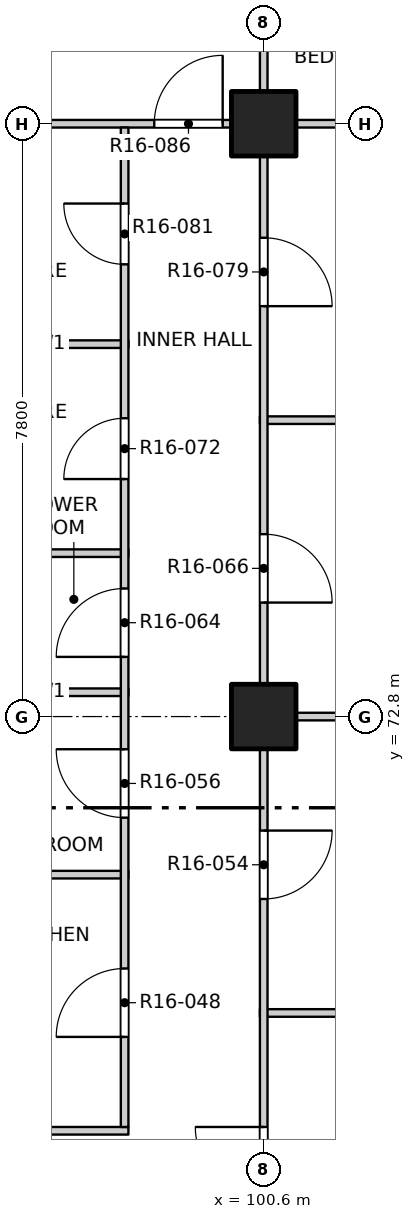
"""IFC4 building model, lengths in metres.
Left out: names, types, materials, properties, quantities, classifications, styles, units other than length and angle.
Written with IfcOpenShell. Run it as: python <this file> out.ifc"""

import sys

from ifc_helpers import new_model, si_unit, direction, frame, frame_2d, origin, origin_2d, place, context, subcontext, project, spatial, rectangle, extrude, element, fill, save


model = new_model("IFC4")
c1 = context("Model", 3, precision=1e-05, world=origin(), true_north=direction((0.0, 1.0)))
c2 = subcontext(c1, "Body", "Model", "MODEL_VIEW")
j1 = project(units=[si_unit("LENGTHUNIT", "METRE"), si_unit("PLANEANGLEUNIT", "RADIAN")], contexts=[c1])
p1 = place(None, origin())
s1 = spatial("IfcSite", under=j1, at=p1, CompositionType="ELEMENT")
p2 = place(p1, origin())
s2 = spatial("IfcBuilding", under=s1, at=p2, CompositionType="ELEMENT")
p3 = place(p2, frame((0.0, 0.0, 169.0)))
s3 = spatial("IfcBuildingStorey", under=s2, at=p3, CompositionType="ELEMENT", Elevation=169.0)
for number, where, z_axis, x_axis in (
    (1, (100.6, 72.8, -0.25), (0.0, 0.0, 1.0), (1.0, 0.0, 0.0)),
    (2, (100.6, 80.6, -0.25), (0.0, 0.0, 1.0), (1.0, 0.0, 0.0)),
):
    element("IfcColumn", number, at=place(p3, frame(where, z_axis=z_axis, x_axis=x_axis)), inside=s3, PredefinedType="COLUMN", context=c2, shape_type="SweptSolid", body=[
        extrude(rectangle(XDim=0.85, YDim=0.85, at=origin_2d()), origin(), (0.0, 0.0, 1.0), 3.35),
    ])
p4 = place(p3, frame((96.6, 67.35, 0.0), z_axis=(0.0, 0.0, 1.0), x_axis=(1.0, 0.0, 0.0)))
e3 = element("IfcWall", 3, at=p4, inside=s3, PredefinedType="PARTITIONING", context=c2, shape_type="SweptSolid", body=[
    extrude(rectangle(XDim=2.22, YDim=0.1, at=frame_2d((1.11, 0.0))), origin(), (0.0, 0.0, 1.0), 3.1),
])
p5 = place(p3, frame((100.55, 68.9, 0.0), z_axis=(0.0, 0.0, 1.0), x_axis=(1.0, 0.0, 0.0)))
e4 = element("IfcWall", 4, at=p5, inside=s3, PredefinedType="PARTITIONING", context=c2, shape_type="SweptSolid", body=[
    extrude(rectangle(XDim=3.65, YDim=0.1, at=frame_2d((1.825, 0.0))), origin(), (0.0, 0.0, 1.0), 3.1),
])
p6 = place(p3, frame((96.6, 70.72, 0.0), z_axis=(0.0, 0.0, 1.0), x_axis=(1.0, 0.0, 0.0)))
e5 = element("IfcWall", 5, at=p6, inside=s3, PredefinedType="PARTITIONING", context=c2, shape_type="SweptSolid", body=[
    extrude(rectangle(XDim=2.22, YDim=0.1, at=frame_2d((1.11, 0.0))), origin(), (0.0, 0.0, 1.0), 3.1),
])
p7 = place(p3, frame((100.55, 72.8, 0.0), z_axis=(0.0, 0.0, 1.0), x_axis=(1.0, 0.0, 0.0)))
e6 = element("IfcWall", 6, at=p7, inside=s3, PredefinedType="PARTITIONING", context=c2, shape_type="SweptSolid", body=[
    extrude(rectangle(XDim=3.65, YDim=0.1, at=frame_2d((1.825, 0.0))), origin(), (0.0, 0.0, 1.0), 3.1),
])
for number, where, z_axis, x_axis in (
    (7, (96.6, 73.12, 0.0), (0.0, 0.0, 1.0), (1.0, 0.0, 0.0)),
    (8, (96.6, 74.95, 0.0), (0.0, 0.0, 1.0), (1.0, 0.0, 0.0)),
):
    element("IfcWall", number, at=place(p3, frame(where, z_axis=z_axis, x_axis=x_axis)), inside=s3, PredefinedType="PARTITIONING", context=c2, shape_type="SweptSolid", body=[
        extrude(rectangle(XDim=2.22, YDim=0.1, at=frame_2d((1.11, 0.0))), origin(), (0.0, 0.0, 1.0), 3.1),
    ])
p8 = place(p3, frame((100.55, 76.7, 0.0), z_axis=(0.0, 0.0, 1.0), x_axis=(1.0, 0.0, 0.0)))
e9 = element("IfcWall", 9, at=p8, inside=s3, PredefinedType="PARTITIONING", context=c2, shape_type="SweptSolid", body=[
    extrude(rectangle(XDim=3.65, YDim=0.1, at=frame_2d((1.825, 0.0))), origin(), (0.0, 0.0, 1.0), 3.1),
])
p9 = place(p3, frame((96.6, 77.7, 0.0), z_axis=(0.0, 0.0, 1.0), x_axis=(1.0, 0.0, 0.0)))
e10 = element("IfcWall", 10, at=p9, inside=s3, PredefinedType="PARTITIONING", context=c2, shape_type="SweptSolid", body=[
    extrude(rectangle(XDim=2.22, YDim=0.1, at=frame_2d((1.11, 0.0))), origin(), (0.0, 0.0, 1.0), 3.1),
])
p10 = place(p3, frame((96.6, 80.6, 0.0), z_axis=(0.0, 0.0, 1.0), x_axis=(1.0, 0.0, 0.0)))
e11 = element("IfcWall", 11, at=p10, inside=s3, PredefinedType="PARTITIONING", context=c2, shape_type="SweptSolid", body=[
    extrude(rectangle(XDim=7.6, YDim=0.1, at=frame_2d((3.8, 0.0))), origin(), (0.0, 0.0, 1.0), 3.1),
])
p11 = place(p10, frame((2.56, 0.0, 0.0)))
e12 = element("IfcOpeningElement", 12, at=p11, cuts=e11, PredefinedType="OPENING", context=c2, shape_type="SweptSolid", body=[
    extrude(rectangle(XDim=0.9, YDim=2.1, at=frame_2d((0.45, 1.05))), frame((0.0, 0.06, 0.0), z_axis=(0.0, -1.0, 0.0), x_axis=(1.0, 0.0, 0.0)), (0.0, 0.0, 1.0), 0.12),
])
p12 = place(p3, frame((98.77, 67.4, 0.0), z_axis=(0.0, 0.0, 1.0), x_axis=(0.0, 1.0, 0.0)))
e13 = element("IfcWall", 13, at=p12, inside=s3, PredefinedType="PARTITIONING", context=c2, shape_type="SweptSolid", body=[
    extrude(rectangle(XDim=13.15, YDim=0.1, at=frame_2d((6.575, 0.0))), origin(), (0.0, 0.0, 1.0), 3.1),
])
p13 = place(p12, frame((1.185, 0.0, 0.0)))
e14 = element("IfcOpeningElement", 14, at=p13, cuts=e13, PredefinedType="OPENING", context=c2, shape_type="SweptSolid", body=[
    extrude(rectangle(XDim=0.9, YDim=2.1, at=frame_2d((0.45, 1.05))), frame((0.0, 0.06, 0.0), z_axis=(0.0, -1.0, 0.0), x_axis=(1.0, 0.0, 0.0)), (0.0, 0.0, 1.0), 0.12),
])
p14 = place(p12, frame((4.07, 0.0, 0.0)))
e15 = element("IfcOpeningElement", 15, at=p14, cuts=e13, PredefinedType="OPENING", context=c2, shape_type="SweptSolid", body=[
    extrude(rectangle(XDim=0.9, YDim=2.1, at=frame_2d((0.45, 1.05))), frame((0.0, 0.06, 0.0), z_axis=(0.0, -1.0, 0.0), x_axis=(1.0, 0.0, 0.0)), (0.0, 0.0, 1.0), 0.12),
])
p15 = place(p12, frame((6.185, 0.0, 0.0)))
e16 = element("IfcOpeningElement", 16, at=p15, cuts=e13, PredefinedType="OPENING", context=c2, shape_type="SweptSolid", body=[
    extrude(rectangle(XDim=0.9, YDim=2.1, at=frame_2d((0.45, 1.05))), frame((0.0, 0.06, 0.0), z_axis=(0.0, -1.0, 0.0), x_axis=(1.0, 0.0, 0.0)), (0.0, 0.0, 1.0), 0.12),
])
p16 = place(p12, frame((8.525, 0.0, 0.0)))
e17 = element("IfcOpeningElement", 17, at=p16, cuts=e13, PredefinedType="OPENING", context=c2, shape_type="SweptSolid", body=[
    extrude(rectangle(XDim=0.8, YDim=2.1, at=frame_2d((0.4, 1.05))), frame((0.0, 0.06, 0.0), z_axis=(0.0, -1.0, 0.0), x_axis=(1.0, 0.0, 0.0)), (0.0, 0.0, 1.0), 0.12),
])
p17 = place(p12, frame((11.35, 0.0, 0.0)))
e18 = element("IfcOpeningElement", 18, at=p17, cuts=e13, PredefinedType="OPENING", context=c2, shape_type="SweptSolid", body=[
    extrude(rectangle(XDim=0.8, YDim=2.1, at=frame_2d((0.4, 1.05))), frame((0.0, 0.06, 0.0), z_axis=(0.0, -1.0, 0.0), x_axis=(1.0, 0.0, 0.0)), (0.0, 0.0, 1.0), 0.12),
])
p18 = place(p3, frame((100.6, 45.8, 0.0), z_axis=(0.0, 0.0, 1.0), x_axis=(0.0, 1.0, 0.0)))
e19 = element("IfcWall", 19, at=p18, inside=s3, PredefinedType="PARTITIONING", context=c2, shape_type="SweptSolid", body=[
    extrude(rectangle(XDim=38.4, YDim=0.1, at=frame_2d((19.2, 0.0))), origin(), (0.0, 0.0, 1.0), 3.1),
])
p19 = place(p18, frame((1.05, 0.0, 0.0)))
e20 = element("IfcOpeningElement", 20, at=p19, cuts=e19, PredefinedType="OPENING", context=c2, shape_type="SweptSolid", body=[
    extrude(rectangle(XDim=1.2, YDim=2.1, at=frame_2d((0.6, 1.05))), frame((0.0, 0.06, 0.0), z_axis=(0.0, -1.0, 0.0), x_axis=(1.0, 0.0, 0.0)), (0.0, 0.0, 1.0), 0.12),
])
p20 = place(p18, frame((6.9, 0.0, 0.0)))
e21 = element("IfcOpeningElement", 21, at=p20, cuts=e19, PredefinedType="OPENING", context=c2, shape_type="SweptSolid", body=[
    extrude(rectangle(XDim=1.2, YDim=2.1, at=frame_2d((0.6, 1.05))), frame((0.0, 0.06, 0.0), z_axis=(0.0, -1.0, 0.0), x_axis=(1.0, 0.0, 0.0)), (0.0, 0.0, 1.0), 0.12),
])
p21 = place(p18, frame((12.9, 0.0, 0.0)))
e22 = element("IfcOpeningElement", 22, at=p21, cuts=e19, PredefinedType="OPENING", context=c2, shape_type="SweptSolid", body=[
    extrude(rectangle(XDim=0.9, YDim=2.1, at=frame_2d((0.45, 1.05))), frame((0.0, 0.06, 0.0), z_axis=(0.0, -1.0, 0.0), x_axis=(1.0, 0.0, 0.0)), (0.0, 0.0, 1.0), 0.12),
])
p22 = place(p18, frame((16.8, 0.0, 0.0)))
e23 = element("IfcOpeningElement", 23, at=p22, cuts=e19, PredefinedType="OPENING", context=c2, shape_type="SweptSolid", body=[
    extrude(rectangle(XDim=0.9, YDim=2.1, at=frame_2d((0.45, 1.05))), frame((0.0, 0.06, 0.0), z_axis=(0.0, -1.0, 0.0), x_axis=(1.0, 0.0, 0.0)), (0.0, 0.0, 1.0), 0.12),
])
p23 = place(p18, frame((20.7, 0.0, 0.0)))
e24 = element("IfcOpeningElement", 24, at=p23, cuts=e19, PredefinedType="OPENING", context=c2, shape_type="SweptSolid", body=[
    extrude(rectangle(XDim=0.9, YDim=2.1, at=frame_2d((0.45, 1.05))), frame((0.0, 0.06, 0.0), z_axis=(0.0, -1.0, 0.0), x_axis=(1.0, 0.0, 0.0)), (0.0, 0.0, 1.0), 0.12),
])
p24 = place(p18, frame((24.6, 0.0, 0.0)))
e25 = element("IfcOpeningElement", 25, at=p24, cuts=e19, PredefinedType="OPENING", context=c2, shape_type="SweptSolid", body=[
    extrude(rectangle(XDim=0.9, YDim=2.1, at=frame_2d((0.45, 1.05))), frame((0.0, 0.06, 0.0), z_axis=(0.0, -1.0, 0.0), x_axis=(1.0, 0.0, 0.0)), (0.0, 0.0, 1.0), 0.12),
])
p25 = place(p18, frame((28.5, 0.0, 0.0)))
e26 = element("IfcOpeningElement", 26, at=p25, cuts=e19, PredefinedType="OPENING", context=c2, shape_type="SweptSolid", body=[
    extrude(rectangle(XDim=0.9, YDim=2.1, at=frame_2d((0.45, 1.05))), frame((0.0, 0.06, 0.0), z_axis=(0.0, -1.0, 0.0), x_axis=(1.0, 0.0, 0.0)), (0.0, 0.0, 1.0), 0.12),
])
p26 = place(p18, frame((32.4, 0.0, 0.0)))
e27 = element("IfcOpeningElement", 27, at=p26, cuts=e19, PredefinedType="OPENING", context=c2, shape_type="SweptSolid", body=[
    extrude(rectangle(XDim=0.9, YDim=2.1, at=frame_2d((0.45, 1.05))), frame((0.0, 0.06, 0.0), z_axis=(0.0, -1.0, 0.0), x_axis=(1.0, 0.0, 0.0)), (0.0, 0.0, 1.0), 0.12),
])
p27 = place(p18, frame((36.15, 0.0, 0.0)))
e28 = element("IfcOpeningElement", 28, at=p27, cuts=e19, PredefinedType="OPENING", context=c2, shape_type="SweptSolid", body=[
    extrude(rectangle(XDim=1.2, YDim=2.1, at=frame_2d((0.6, 1.05))), frame((0.0, 0.06, 0.0), z_axis=(0.0, -1.0, 0.0), x_axis=(1.0, 0.0, 0.0)), (0.0, 0.0, 1.0), 0.12),
])
p28 = place(p23, origin())
e29 = element("IfcDoor", 29, at=p28, inside=s3, OperationType="SINGLE_SWING_RIGHT", PredefinedType="DOOR", context=c2, shape_type="SweptSolid", body=[
    extrude(rectangle(XDim=0.9, YDim=2.1, at=frame_2d((0.45, 1.05))), frame((0.0, 0.025, 0.0), z_axis=(0.0, -1.0, 0.0), x_axis=(1.0, 0.0, 0.0)), (0.0, 0.0, 1.0), 0.05),
])
fill(e24, e29)
p29 = place(p13, origin())
e30 = element("IfcDoor", 30, at=p29, inside=s3, OperationType="SINGLE_SWING_LEFT", PredefinedType="DOOR", context=c2, shape_type="SweptSolid", body=[
    extrude(rectangle(XDim=0.9, YDim=2.1, at=frame_2d((0.45, 1.05))), frame((0.0, 0.025, 0.0), z_axis=(0.0, -1.0, 0.0), x_axis=(1.0, 0.0, 0.0)), (0.0, 0.0, 1.0), 0.05),
])
fill(e14, e30)
p30 = place(p24, origin())
e31 = element("IfcDoor", 31, at=p30, inside=s3, OperationType="SINGLE_SWING_LEFT", PredefinedType="DOOR", context=c2, shape_type="SweptSolid", body=[
    extrude(rectangle(XDim=0.9, YDim=2.1, at=frame_2d((0.45, 1.05))), frame((0.0, 0.025, 0.0), z_axis=(0.0, -1.0, 0.0), x_axis=(1.0, 0.0, 0.0)), (0.0, 0.0, 1.0), 0.05),
])
fill(e25, e31)
p31 = place(p14, origin())
e32 = element("IfcDoor", 32, at=p31, inside=s3, OperationType="SINGLE_SWING_RIGHT", PredefinedType="DOOR", context=c2, shape_type="SweptSolid", body=[
    extrude(rectangle(XDim=0.9, YDim=2.1, at=frame_2d((0.45, 1.05))), frame((0.0, 0.025, 0.0), z_axis=(0.0, -1.0, 0.0), x_axis=(1.0, 0.0, 0.0)), (0.0, 0.0, 1.0), 0.05),
])
fill(e15, e32)
p32 = place(p15, origin())
e33 = element("IfcDoor", 33, at=p32, inside=s3, OperationType="SINGLE_SWING_LEFT", PredefinedType="DOOR", context=c2, shape_type="SweptSolid", body=[
    extrude(rectangle(XDim=0.9, YDim=2.1, at=frame_2d((0.45, 1.05))), frame((0.0, 0.025, 0.0), z_axis=(0.0, -1.0, 0.0), x_axis=(1.0, 0.0, 0.0)), (0.0, 0.0, 1.0), 0.05),
])
fill(e16, e33)
p33 = place(p25, origin())
e34 = element("IfcDoor", 34, at=p33, inside=s3, OperationType="SINGLE_SWING_RIGHT", PredefinedType="DOOR", context=c2, shape_type="SweptSolid", body=[
    extrude(rectangle(XDim=0.9, YDim=2.1, at=frame_2d((0.45, 1.05))), frame((0.0, 0.025, 0.0), z_axis=(0.0, -1.0, 0.0), x_axis=(1.0, 0.0, 0.0)), (0.0, 0.0, 1.0), 0.05),
])
fill(e26, e34)
p34 = place(p16, origin())
e35 = element("IfcDoor", 35, at=p34, inside=s3, OperationType="SINGLE_SWING_LEFT", PredefinedType="DOOR", context=c2, shape_type="SweptSolid", body=[
    extrude(rectangle(XDim=0.8, YDim=2.1, at=frame_2d((0.4, 1.05))), frame((0.0, 0.025, 0.0), z_axis=(0.0, -1.0, 0.0), x_axis=(1.0, 0.0, 0.0)), (0.0, 0.0, 1.0), 0.05),
])
fill(e17, e35)
p35 = place(p26, origin())
e36 = element("IfcDoor", 36, at=p35, inside=s3, OperationType="SINGLE_SWING_RIGHT", PredefinedType="DOOR", context=c2, shape_type="SweptSolid", body=[
    extrude(rectangle(XDim=0.9, YDim=2.1, at=frame_2d((0.45, 1.05))), frame((0.0, 0.025, 0.0), z_axis=(0.0, -1.0, 0.0), x_axis=(1.0, 0.0, 0.0)), (0.0, 0.0, 1.0), 0.05),
])
fill(e27, e36)
p36 = place(p17, origin())
e37 = element("IfcDoor", 37, at=p36, inside=s3, OperationType="SINGLE_SWING_RIGHT", PredefinedType="DOOR", context=c2, shape_type="SweptSolid", body=[
    extrude(rectangle(XDim=0.8, YDim=2.1, at=frame_2d((0.4, 1.05))), frame((0.0, 0.025, 0.0), z_axis=(0.0, -1.0, 0.0), x_axis=(1.0, 0.0, 0.0)), (0.0, 0.0, 1.0), 0.05),
])
fill(e18, e37)
p37 = place(p11, origin())
e38 = element("IfcDoor", 38, at=p37, inside=s3, OperationType="SINGLE_SWING_RIGHT", PredefinedType="DOOR", context=c2, shape_type="SweptSolid", body=[
    extrude(rectangle(XDim=0.9, YDim=2.1, at=frame_2d((0.45, 1.05))), frame((0.0, 0.025, 0.0), z_axis=(0.0, -1.0, 0.0), x_axis=(1.0, 0.0, 0.0)), (0.0, 0.0, 1.0), 0.05),
])
fill(e12, e38)
save(model, sys.argv[1])
